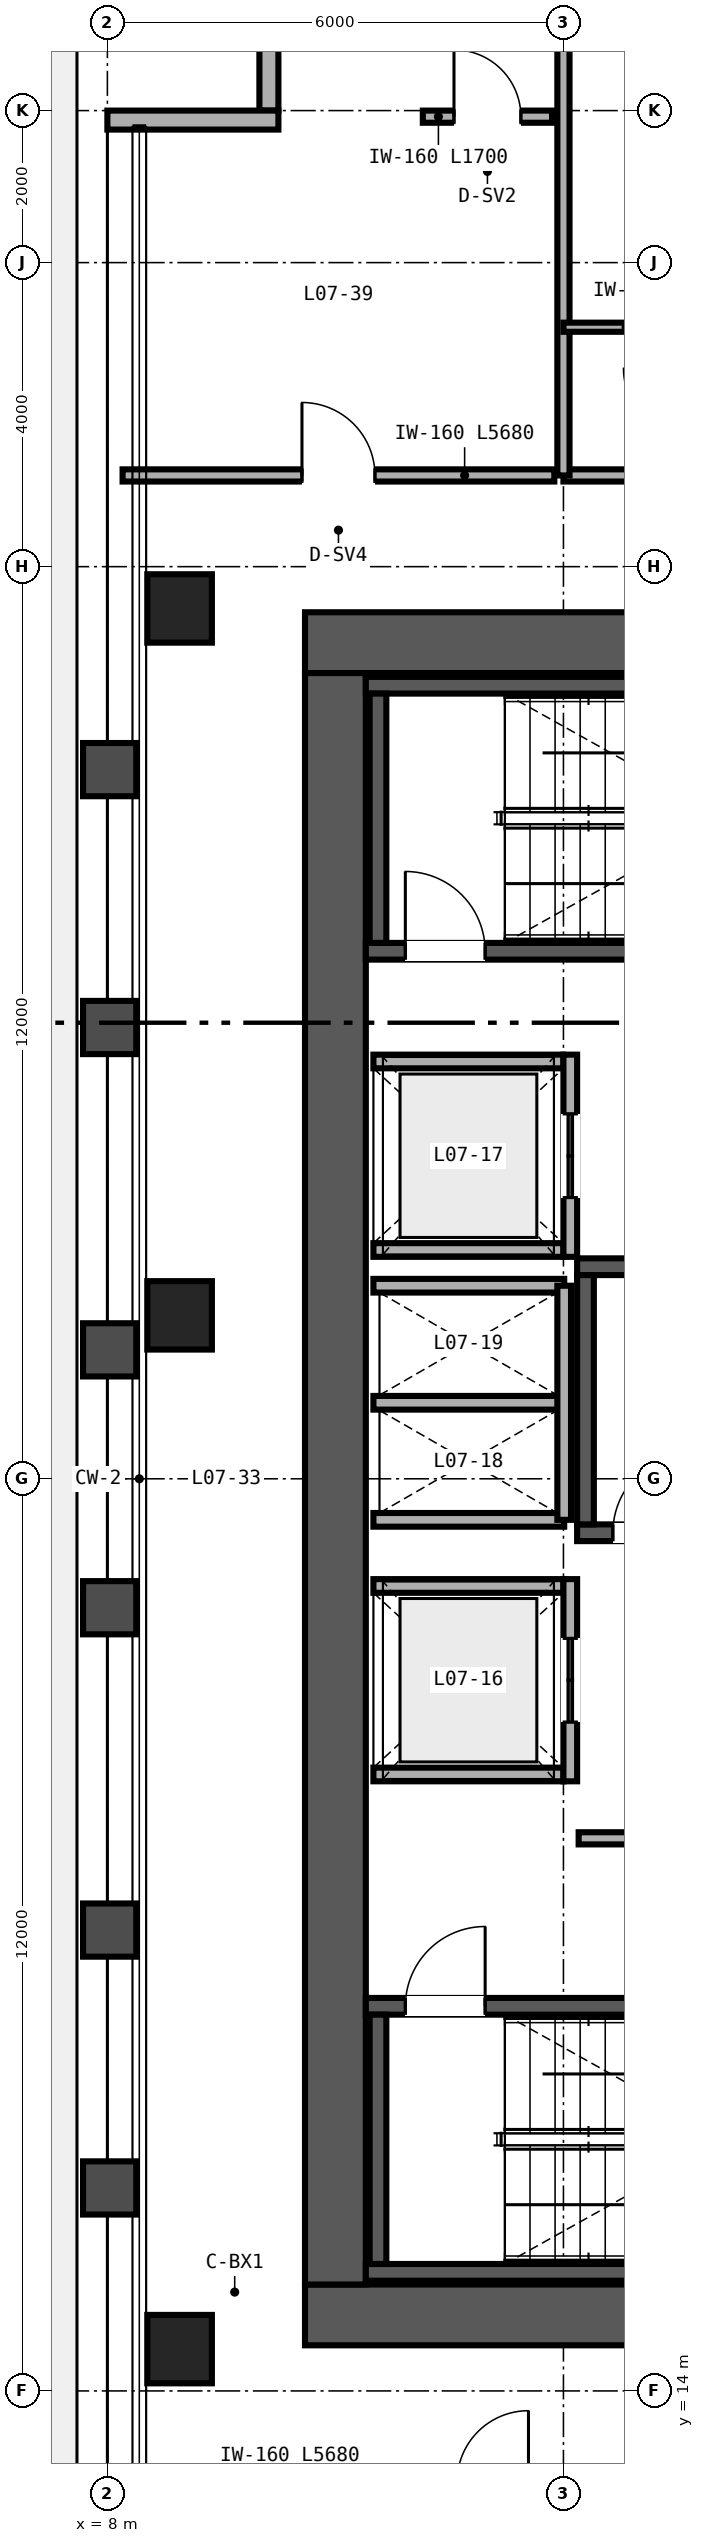
"""IFC4 building model, lengths in metres.
Left out: names, types, materials, properties, quantities, classifications, styles, units other than length and angle.
Written with IfcOpenShell. Run it as: python <this file> out.ifc"""

import sys

from ifc_helpers import new_model, si_unit, direction, frame, frame_2d, origin, origin_2d, place, context, subcontext, project, spatial, rectangle, hollow_rectangle, extrude, source, transform, mapped, element, fill, save


model = new_model("IFC4")
c1 = context("Model", 3, precision=1e-05, world=origin(), true_north=direction((0.0, 1.0)))
c2 = subcontext(c1, "Body", "Model", "MODEL_VIEW")
j1 = project(units=[si_unit("LENGTHUNIT", "METRE"), si_unit("PLANEANGLEUNIT", "RADIAN")], contexts=[c1])
p1 = place(None, origin())
s1 = spatial("IfcSite", under=j1, at=p1, CompositionType="ELEMENT")
p2 = place(p1, origin())
s2 = spatial("IfcBuilding", under=s1, at=p2, CompositionType="ELEMENT")
p3 = place(p2, frame((0.0, 0.0, 34.8)))
s3 = spatial("IfcBuildingStorey", under=s2, at=p3, CompositionType="ELEMENT", Elevation=34.8)
p4 = place(p3, frame((10.6, 15.0, 0.0), z_axis=(0.0, 0.0, 1.0), x_axis=(1.0, 0.0, 0.0)))
e1 = element("IfcWall", 1, at=p4, inside=s3, PredefinedType="SHEAR", context=c2, shape_type="SweptSolid", body=[
    extrude(rectangle(XDim=12.8, YDim=0.8, at=frame_2d((6.4, 0.0))), origin(), (0.0, 0.0, 1.0), 3.35),
])
p5 = place(p4, frame((10.3, 0.0, 0.0)))
e2 = element("IfcOpeningElement", 2, at=p5, cuts=e1, PredefinedType="OPENING", context=c2, shape_type="SweptSolid", body=[
    extrude(rectangle(XDim=1.0, YDim=2.15, at=frame_2d((0.5, 1.075))), frame((0.0, 0.41, 0.0), z_axis=(0.0, -1.0, 0.0), x_axis=(1.0, 0.0, 0.0)), (0.0, 0.0, 1.0), 0.82),
])
p6 = place(p3, frame((10.6, 37.0, 0.0), z_axis=(0.0, 0.0, 1.0), x_axis=(1.0, 0.0, 0.0)))
e3 = element("IfcWall", 3, at=p6, inside=s3, PredefinedType="SHEAR", context=c2, shape_type="SweptSolid", body=[
    extrude(rectangle(XDim=12.8, YDim=0.8, at=frame_2d((6.4, 0.0))), origin(), (0.0, 0.0, 1.0), 3.35),
])
p7 = place(p6, frame((8.98, 0.0, 0.0)))
e4 = element("IfcOpeningElement", 4, at=p7, cuts=e3, PredefinedType="OPENING", context=c2, shape_type="SweptSolid", body=[
    extrude(rectangle(XDim=1.0, YDim=2.15, at=frame_2d((0.5, 1.075))), frame((0.0, 0.41, 0.0), z_axis=(0.0, -1.0, 0.0), x_axis=(1.0, 0.0, 0.0)), (0.0, 0.0, 1.0), 0.82),
])
p8 = place(p3, frame((11.0, 15.4, 0.0), z_axis=(0.0, 0.0, 1.0), x_axis=(0.0, 1.0, 0.0)))
e5 = element("IfcWall", 5, at=p8, inside=s3, PredefinedType="SHEAR", context=c2, shape_type="SweptSolid", body=[
    extrude(rectangle(XDim=21.2, YDim=0.8, at=frame_2d((10.6, 0.0))), origin(), (0.0, 0.0, 1.0), 3.35),
])
p9 = place(p3, frame((11.4, 15.56, 0.0), z_axis=(0.0, 0.0, 1.0), x_axis=(1.0, 0.0, 0.0)))
e6 = element("IfcWall", 6, at=p9, inside=s3, PredefinedType="SHEAR", context=c2, shape_type="SweptSolid", body=[
    extrude(rectangle(XDim=7.91, YDim=0.22, at=frame_2d((3.955, 0.0))), origin(), (0.0, 0.0, 1.0), 3.4),
])
p10 = place(p3, frame((11.4, 19.06, 0.0), z_axis=(0.0, 0.0, 1.0), x_axis=(1.0, 0.0, 0.0)))
e7 = element("IfcWall", 7, at=p10, inside=s3, PredefinedType="SHEAR", context=c2, shape_type="SweptSolid", body=[
    extrude(rectangle(XDim=7.91, YDim=0.22, at=frame_2d((3.955, 0.0))), origin(), (0.0, 0.0, 1.0), 3.4),
])
p11 = place(p10, frame((0.52, 0.0, 0.0)))
e8 = element("IfcOpeningElement", 8, at=p11, cuts=e7, PredefinedType="OPENING", context=c2, shape_type="SweptSolid", body=[
    extrude(rectangle(XDim=1.05, YDim=2.15, at=frame_2d((0.525, 1.075))), frame((0.0, 0.12, 0.0), z_axis=(0.0, -1.0, 0.0), x_axis=(1.0, 0.0, 0.0)), (0.0, 0.0, 1.0), 0.24),
])
p12 = place(p3, frame((11.56, 15.67, 0.0), z_axis=(0.0, 0.0, 1.0), x_axis=(0.0, 1.0, 0.0)))
e9 = element("IfcWall", 9, at=p12, inside=s3, PredefinedType="SHEAR", context=c2, shape_type="SweptSolid", body=[
    extrude(rectangle(XDim=3.28, YDim=0.22, at=frame_2d((1.64, 0.0))), origin(), (0.0, 0.0, 1.0), 3.4),
])
p13 = place(p3, frame((11.4, 32.94, 0.0), z_axis=(0.0, 0.0, 1.0), x_axis=(1.0, 0.0, 0.0)))
e10 = element("IfcWall", 10, at=p13, inside=s3, PredefinedType="SHEAR", context=c2, shape_type="SweptSolid", body=[
    extrude(rectangle(XDim=7.91, YDim=0.22, at=frame_2d((3.955, 0.0))), origin(), (0.0, 0.0, 1.0), 3.4),
])
p14 = place(p13, frame((0.52, 0.0, 0.0)))
e11 = element("IfcOpeningElement", 11, at=p14, cuts=e10, PredefinedType="OPENING", context=c2, shape_type="SweptSolid", body=[
    extrude(rectangle(XDim=1.05, YDim=2.15, at=frame_2d((0.525, 1.075))), frame((0.0, 0.12, 0.0), z_axis=(0.0, -1.0, 0.0), x_axis=(1.0, 0.0, 0.0)), (0.0, 0.0, 1.0), 0.24),
])
p15 = place(p3, frame((11.4, 36.44, 0.0), z_axis=(0.0, 0.0, 1.0), x_axis=(1.0, 0.0, 0.0)))
e12 = element("IfcWall", 12, at=p15, inside=s3, PredefinedType="SHEAR", context=c2, shape_type="SweptSolid", body=[
    extrude(rectangle(XDim=7.91, YDim=0.22, at=frame_2d((3.955, 0.0))), origin(), (0.0, 0.0, 1.0), 3.4),
])
p16 = place(p3, frame((11.56, 33.05, 0.0), z_axis=(0.0, 0.0, 1.0), x_axis=(0.0, 1.0, 0.0)))
e13 = element("IfcWall", 13, at=p16, inside=s3, PredefinedType="SHEAR", context=c2, shape_type="SweptSolid", body=[
    extrude(rectangle(XDim=3.28, YDim=0.22, at=frame_2d((1.64, 0.0))), origin(), (0.0, 0.0, 1.0), 3.4),
])
p17 = place(p3, frame((14.18, 25.29, 0.0), z_axis=(0.0, 0.0, 1.0), x_axis=(1.0, 0.0, 0.0)))
e14 = element("IfcWall", 14, at=p17, inside=s3, PredefinedType="SHEAR", context=c2, shape_type="SweptSolid", body=[
    extrude(rectangle(XDim=8.42, YDim=0.22, at=frame_2d((4.21, 0.0))), origin(), (0.0, 0.0, 1.0), 3.4),
])
p18 = place(p17, frame((0.47, 0.0, 0.0)))
e15 = element("IfcOpeningElement", 15, at=p18, cuts=e14, PredefinedType="OPENING", context=c2, shape_type="SweptSolid", body=[
    extrude(rectangle(XDim=1.05, YDim=2.15, at=frame_2d((0.525, 1.075))), frame((0.0, 0.12, 0.0), z_axis=(0.0, -1.0, 0.0), x_axis=(1.0, 0.0, 0.0)), (0.0, 0.0, 1.0), 0.24),
])
p19 = place(p3, frame((14.18, 28.79, 0.0), z_axis=(0.0, 0.0, 1.0), x_axis=(1.0, 0.0, 0.0)))
e16 = element("IfcWall", 16, at=p19, inside=s3, PredefinedType="SHEAR", context=c2, shape_type="SweptSolid", body=[
    extrude(rectangle(XDim=8.42, YDim=0.22, at=frame_2d((4.21, 0.0))), origin(), (0.0, 0.0, 1.0), 3.4),
])
p20 = place(p3, frame((14.29, 25.4, 0.0), z_axis=(0.0, 0.0, 1.0), x_axis=(0.0, 1.0, 0.0)))
e17 = element("IfcWall", 17, at=p20, inside=s3, PredefinedType="SHEAR", context=c2, shape_type="SweptSolid", body=[
    extrude(rectangle(XDim=3.28, YDim=0.22, at=frame_2d((1.64, 0.0))), origin(), (0.0, 0.0, 1.0), 3.4),
])
m1 = source(origin(), c2, "Body", "SweptSolid", [
    extrude(hollow_rectangle(XDim=0.85, YDim=0.9, WallThickness=0.04, at=origin_2d()), origin(), (0.0, 0.0, 1.0), 3.35),
])
for number, where, z_axis, x_axis in (
    (18, (8.95, 14.55, 0.0), (0.0, 0.0, 1.0), (1.0, 0.0, 0.0)),
    (19, (8.95, 28.15, 0.0), (0.0, 0.0, 1.0), (1.0, 0.0, 0.0)),
    (20, (8.95, 37.45, 0.0), (0.0, 0.0, 1.0), (1.0, 0.0, 0.0)),
):
    element("IfcColumn", number, at=place(p3, frame(where, z_axis=z_axis, x_axis=x_axis)), inside=s3, PredefinedType="COLUMN", context=c2, shape_type="MappedRepresentation", body=[
        mapped(m1, transform((0.0, 0.0, 0.0), scale=1.0)),
    ])
p21 = place(p3, frame((10.125, 46.0, 0.0), z_axis=(0.0, 0.0, 1.0), x_axis=(0.0, -1.0, 0.0)))
e21 = element("IfcWall", 21, at=p21, inside=s3, PredefinedType="SOLIDWALL", context=c2, shape_type="SweptSolid", body=[
    extrude(rectangle(XDim=2.0, YDim=0.25, at=frame_2d((1.0, 0.0))), origin(), (0.0, 0.0, 1.0), 3.35),
])
p22 = place(p3, frame((10.25, 43.875, 0.0), z_axis=(0.0, 0.0, 1.0), x_axis=(-1.0, 0.0, 0.0)))
e22 = element("IfcWall", 22, at=p22, inside=s3, PredefinedType="SOLIDWALL", context=c2, shape_type="SweptSolid", body=[
    extrude(rectangle(XDim=2.25, YDim=0.25, at=frame_2d((1.125, 0.0))), origin(), (0.0, 0.0, 1.0), 3.35),
])
for number, where, z_axis, x_axis in (
    (23, (11.5, 22.11, 0.0), (0.0, 0.0, 1.0), (1.0, 0.0, 0.0)),
    (24, (11.5, 24.59, 0.0), (0.0, 0.0, 1.0), (1.0, 0.0, 0.0)),
):
    element("IfcWall", number, at=place(p3, frame(where, z_axis=z_axis, x_axis=x_axis)), inside=s3, PredefinedType="SOLIDWALL", context=c2, shape_type="SweptSolid", body=[
        extrude(rectangle(XDim=2.5, YDim=0.18, at=frame_2d((1.25, 0.0))), origin(), (0.0, 0.0, 1.0), 3.35),
    ])
p23 = place(p3, frame((14.09, 22.02, 0.0), z_axis=(0.0, 0.0, 1.0), x_axis=(0.0, 1.0, 0.0)))
e25 = element("IfcWall", 25, at=p23, inside=s3, PredefinedType="SOLIDWALL", context=c2, shape_type="SweptSolid", body=[
    extrude(rectangle(XDim=2.66, YDim=0.18, at=frame_2d((1.33, 0.0))), origin(), (0.0, 0.0, 1.0), 3.35),
])
p24 = place(p23, frame((0.78, 0.0, 0.0)))
e26 = element("IfcOpeningElement", 26, at=p24, cuts=e25, PredefinedType="OPENING", context=c2, shape_type="SweptSolid", body=[
    extrude(rectangle(XDim=1.1, YDim=2.2, at=frame_2d((0.55, 1.1))), frame((0.0, 0.1, 0.0), z_axis=(0.0, -1.0, 0.0), x_axis=(1.0, 0.0, 0.0)), (0.0, 0.0, 1.0), 0.2),
])
for number, where, z_axis, x_axis in (
    (27, (11.5, 29.01, 0.0), (0.0, 0.0, 1.0), (1.0, 0.0, 0.0)),
    (28, (11.5, 31.49, 0.0), (0.0, 0.0, 1.0), (1.0, 0.0, 0.0)),
):
    element("IfcWall", number, at=place(p3, frame(where, z_axis=z_axis, x_axis=x_axis)), inside=s3, PredefinedType="SOLIDWALL", context=c2, shape_type="SweptSolid", body=[
        extrude(rectangle(XDim=2.5, YDim=0.18, at=frame_2d((1.25, 0.0))), origin(), (0.0, 0.0, 1.0), 3.35),
    ])
p25 = place(p3, frame((14.09, 28.92, 0.0), z_axis=(0.0, 0.0, 1.0), x_axis=(0.0, 1.0, 0.0)))
e29 = element("IfcWall", 29, at=p25, inside=s3, PredefinedType="SOLIDWALL", context=c2, shape_type="SweptSolid", body=[
    extrude(rectangle(XDim=2.66, YDim=0.18, at=frame_2d((1.33, 0.0))), origin(), (0.0, 0.0, 1.0), 3.35),
])
p26 = place(p25, frame((0.78, 0.0, 0.0)))
e30 = element("IfcOpeningElement", 30, at=p26, cuts=e29, PredefinedType="OPENING", context=c2, shape_type="SweptSolid", body=[
    extrude(rectangle(XDim=1.1, YDim=2.2, at=frame_2d((0.55, 1.1))), frame((0.0, 0.1, 0.0), z_axis=(0.0, -1.0, 0.0), x_axis=(1.0, 0.0, 0.0)), (0.0, 0.0, 1.0), 0.2),
])
for number, where, z_axis, x_axis in (
    (31, (11.5, 25.46, 0.0), (0.0, 0.0, 1.0), (1.0, 0.0, 0.0)),
    (32, (11.5, 27.0, 0.0), (0.0, 0.0, 1.0), (1.0, 0.0, 0.0)),
    (33, (11.5, 28.54, 0.0), (0.0, 0.0, 1.0), (1.0, 0.0, 0.0)),
):
    element("IfcWall", number, at=place(p3, frame(where, z_axis=z_axis, x_axis=x_axis)), inside=s3, PredefinedType="SOLIDWALL", context=c2, shape_type="SweptSolid", body=[
        extrude(rectangle(XDim=2.51, YDim=0.18, at=frame_2d((1.255, 0.0))), origin(), (0.0, 0.0, 1.0), 3.35),
    ])
p27 = place(p3, frame((14.01, 25.46, 0.0), z_axis=(0.0, 0.0, 1.0), x_axis=(0.0, 1.0, 0.0)))
e34 = element("IfcWall", 34, at=p27, inside=s3, PredefinedType="SOLIDWALL", context=c2, shape_type="SweptSolid", body=[
    extrude(rectangle(XDim=3.08, YDim=0.18, at=frame_2d((1.54, 0.0))), origin(), (0.0, 0.0, 1.0), 3.35),
])
p28 = place(p3, frame((14.2, 21.27, 0.0), z_axis=(0.0, 0.0, 1.0), x_axis=(1.0, 0.0, 0.0)))
e35 = element("IfcWall", 35, at=p28, inside=s3, PredefinedType="PARTITIONING", context=c2, shape_type="SweptSolid", body=[
    extrude(rectangle(XDim=4.58, YDim=0.16, at=frame_2d((2.29, 0.0))), origin(), (0.0, 0.0, 1.0), 3.35),
])
p29 = place(p28, frame((1.8, 0.0, 0.0)))
e36 = element("IfcOpeningElement", 36, at=p29, cuts=e35, PredefinedType="OPENING", context=c2, shape_type="SweptSolid", body=[
    extrude(rectangle(XDim=1.0, YDim=2.15, at=frame_2d((0.5, 1.075))), frame((0.0, 0.09, 0.0), z_axis=(0.0, -1.0, 0.0), x_axis=(1.0, 0.0, 0.0)), (0.0, 0.0, 1.0), 0.18),
])
p30 = place(p3, frame((8.2, 39.2, 0.0), z_axis=(0.0, 0.0, 1.0), x_axis=(1.0, 0.0, 0.0)))
e37 = element("IfcWall", 37, at=p30, inside=s3, PredefinedType="PARTITIONING", context=c2, shape_type="SweptSolid", body=[
    extrude(rectangle(XDim=5.68, YDim=0.16, at=frame_2d((2.84, 0.0))), origin(), (0.0, 0.0, 1.0), 3.35),
])
p31 = place(p30, frame((2.36, 0.0, 0.0)))
e38 = element("IfcOpeningElement", 38, at=p31, cuts=e37, PredefinedType="OPENING", context=c2, shape_type="SweptSolid", body=[
    extrude(rectangle(XDim=0.96, YDim=2.15, at=frame_2d((0.48, 1.075))), frame((0.0, 0.09, 0.0), z_axis=(0.0, -1.0, 0.0), x_axis=(1.0, 0.0, 0.0)), (0.0, 0.0, 1.0), 0.18),
])
p32 = place(p3, frame((12.15, 43.92, 0.0), z_axis=(0.0, 0.0, 1.0), x_axis=(1.0, 0.0, 0.0)))
e39 = element("IfcWall", 39, at=p32, inside=s3, PredefinedType="PARTITIONING", context=c2, shape_type="SweptSolid", body=[
    extrude(rectangle(XDim=1.7, YDim=0.16, at=frame_2d((0.85, 0.0))), origin(), (0.0, 0.0, 1.0), 3.35),
])
p33 = place(p32, frame((0.41, 0.0, 0.0)))
e40 = element("IfcOpeningElement", 40, at=p33, cuts=e39, PredefinedType="OPENING", context=c2, shape_type="SweptSolid", body=[
    extrude(rectangle(XDim=0.88, YDim=2.15, at=frame_2d((0.44, 1.075))), frame((0.0, 0.09, 0.0), z_axis=(0.0, -1.0, 0.0), x_axis=(1.0, 0.0, 0.0)), (0.0, 0.0, 1.0), 0.18),
])
p34 = place(p3, frame((14.0, 39.2, 0.0), z_axis=(0.0, 0.0, 1.0), x_axis=(1.0, 0.0, 0.0)))
e41 = element("IfcWall", 41, at=p34, inside=s3, PredefinedType="PARTITIONING", context=c2, shape_type="SweptSolid", body=[
    extrude(rectangle(XDim=36.0, YDim=0.16, at=frame_2d((18.0, 0.0))), origin(), (0.0, 0.0, 1.0), 2.571),
])
p35 = place(p34, frame((3.34, 0.0, 0.0)))
e42 = element("IfcOpeningElement", 42, at=p35, cuts=e41, PredefinedType="OPENING", context=c2, shape_type="SweptSolid", body=[
    extrude(rectangle(XDim=0.94, YDim=2.15, at=frame_2d((0.47, 1.075))), frame((0.0, 0.09, 0.0), z_axis=(0.0, -1.0, 0.0), x_axis=(1.0, 0.0, 0.0)), (0.0, 0.0, 1.0), 0.18),
])
p36 = place(p34, frame((7.79, 0.0, 0.0)))
e43 = element("IfcOpeningElement", 43, at=p36, cuts=e41, PredefinedType="OPENING", context=c2, shape_type="SweptSolid", body=[
    extrude(rectangle(XDim=0.94, YDim=2.15, at=frame_2d((0.47, 1.075))), frame((0.0, 0.09, 0.0), z_axis=(0.0, -1.0, 0.0), x_axis=(1.0, 0.0, 0.0)), (0.0, 0.0, 1.0), 0.18),
])
p37 = place(p34, frame((12.54, 0.0, 0.0)))
e44 = element("IfcOpeningElement", 44, at=p37, cuts=e41, PredefinedType="OPENING", context=c2, shape_type="SweptSolid", body=[
    extrude(rectangle(XDim=0.94, YDim=2.15, at=frame_2d((0.47, 1.075))), frame((0.0, 0.09, 0.0), z_axis=(0.0, -1.0, 0.0), x_axis=(1.0, 0.0, 0.0)), (0.0, 0.0, 1.0), 0.18),
])
p38 = place(p34, frame((17.14, 0.0, 0.0)))
e45 = element("IfcOpeningElement", 45, at=p38, cuts=e41, PredefinedType="OPENING", context=c2, shape_type="SweptSolid", body=[
    extrude(rectangle(XDim=0.94, YDim=2.15, at=frame_2d((0.47, 1.075))), frame((0.0, 0.09, 0.0), z_axis=(0.0, -1.0, 0.0), x_axis=(1.0, 0.0, 0.0)), (0.0, 0.0, 1.0), 0.18),
])
p39 = place(p34, frame((21.74, 0.0, 0.0)))
e46 = element("IfcOpeningElement", 46, at=p39, cuts=e41, PredefinedType="OPENING", context=c2, shape_type="SweptSolid", body=[
    extrude(rectangle(XDim=0.94, YDim=2.15, at=frame_2d((0.47, 1.075))), frame((0.0, 0.09, 0.0), z_axis=(0.0, -1.0, 0.0), x_axis=(1.0, 0.0, 0.0)), (0.0, 0.0, 1.0), 0.18),
])
p40 = place(p34, frame((24.89, 0.0, 0.0)))
e47 = element("IfcOpeningElement", 47, at=p40, cuts=e41, PredefinedType="OPENING", context=c2, shape_type="SweptSolid", body=[
    extrude(rectangle(XDim=0.94, YDim=2.15, at=frame_2d((0.47, 1.075))), frame((0.0, 0.09, 0.0), z_axis=(0.0, -1.0, 0.0), x_axis=(1.0, 0.0, 0.0)), (0.0, 0.0, 1.0), 0.18),
])
p41 = place(p34, frame((30.54, 0.0, 0.0)))
e48 = element("IfcOpeningElement", 48, at=p41, cuts=e41, PredefinedType="OPENING", context=c2, shape_type="SweptSolid", body=[
    extrude(rectangle(XDim=0.94, YDim=2.15, at=frame_2d((0.47, 1.075))), frame((0.0, 0.09, 0.0), z_axis=(0.0, -1.0, 0.0), x_axis=(1.0, 0.0, 0.0)), (0.0, 0.0, 1.0), 0.18),
])
p42 = place(p34, frame((34.74, 0.0, 0.0)))
e49 = element("IfcOpeningElement", 49, at=p42, cuts=e41, PredefinedType="OPENING", context=c2, shape_type="SweptSolid", body=[
    extrude(rectangle(XDim=0.94, YDim=2.15, at=frame_2d((0.47, 1.075))), frame((0.0, 0.09, 0.0), z_axis=(0.0, -1.0, 0.0), x_axis=(1.0, 0.0, 0.0)), (0.0, 0.0, 1.0), 0.18),
])
p43 = place(p3, frame((14.0, 39.2, 0.0), z_axis=(0.0, 0.0, 1.0), x_axis=(0.0, 1.0, 0.0)))
e50 = element("IfcWall", 50, at=p43, inside=s3, PredefinedType="PARTITIONING", context=c2, shape_type="SweptSolid", body=[
    extrude(rectangle(XDim=10.44, YDim=0.16, at=frame_2d((5.22, 0.0))), origin(), (0.0, 0.0, 1.0), 2.657),
])
p44 = place(p3, frame((14.0, 41.15, 0.0), z_axis=(0.0, 0.0, 1.0), x_axis=(1.0, 0.0, 0.0)))
e51 = element("IfcWall", 51, at=p44, inside=s3, PredefinedType="PARTITIONING", context=c2, shape_type="SweptSolid", body=[
    extrude(rectangle(XDim=1.65, YDim=0.12, at=frame_2d((0.825, 0.0))), origin(), (0.0, 0.0, 1.0), 3.35),
])
m2 = source(origin(), c2, "Body", "SweptSolid", [
    extrude(rectangle(XDim=1.05, YDim=2.15, at=frame_2d((0.525, 1.075))), frame((0.0, 0.025, 0.0), z_axis=(0.0, -1.0, 0.0), x_axis=(1.0, 0.0, 0.0)), (0.0, 0.0, 1.0), 0.05),
])
p45 = place(p11, origin())
e52 = element("IfcDoor", 52, at=p45, inside=s3, OperationType="SINGLE_SWING_RIGHT", PredefinedType="DOOR", context=c2, shape_type="MappedRepresentation", body=[
    mapped(m2, transform((0.0, 0.0, 0.0), scale=1.0)),
])
fill(e8, e52)
p46 = place(p14, origin())
e53 = element("IfcDoor", 53, at=p46, inside=s3, OperationType="SINGLE_SWING_LEFT", PredefinedType="DOOR", context=c2, shape_type="MappedRepresentation", body=[
    mapped(m2, transform((0.0, 0.0, 0.0), scale=1.0)),
])
fill(e11, e53)
p47 = place(p18, origin())
e54 = element("IfcDoor", 54, at=p47, inside=s3, OperationType="SINGLE_SWING_RIGHT", PredefinedType="DOOR", context=c2, shape_type="MappedRepresentation", body=[
    mapped(m2, transform((0.0, 0.0, 0.0), scale=1.0)),
])
fill(e15, e54)
m3 = source(origin(), c2, "Body", "SweptSolid", [
    extrude(rectangle(XDim=1.1, YDim=2.2, at=frame_2d((0.55, 1.1))), frame((0.0, 0.025, 0.0), z_axis=(0.0, -1.0, 0.0), x_axis=(1.0, 0.0, 0.0)), (0.0, 0.0, 1.0), 0.05),
])
p48 = place(p24, origin())
e55 = element("IfcDoor", 55, at=p48, inside=s3, OperationType="DOUBLE_DOOR_SLIDING", PredefinedType="DOOR", context=c2, shape_type="MappedRepresentation", body=[
    mapped(m3, transform((0.0, 0.0, 0.0), scale=1.0)),
])
fill(e26, e55)
p49 = place(p26, origin())
e56 = element("IfcDoor", 56, at=p49, inside=s3, OperationType="DOUBLE_DOOR_SLIDING", PredefinedType="DOOR", context=c2, shape_type="MappedRepresentation", body=[
    mapped(m3, transform((0.0, 0.0, 0.0), scale=1.0)),
])
fill(e30, e56)
m4 = source(origin(), c2, "Body", "SweptSolid", [
    extrude(rectangle(XDim=0.96, YDim=2.15, at=frame_2d((0.48, 1.075))), frame((0.0, 0.025, 0.0), z_axis=(0.0, -1.0, 0.0), x_axis=(1.0, 0.0, 0.0)), (0.0, 0.0, 1.0), 0.05),
])
p50 = place(p31, origin())
e57 = element("IfcDoor", 57, at=p50, inside=s3, OperationType="SINGLE_SWING_LEFT", PredefinedType="DOOR", context=c2, shape_type="MappedRepresentation", body=[
    mapped(m4, transform((0.0, 0.0, 0.0), scale=1.0)),
])
fill(e38, e57)
m5 = source(origin(), c2, "Body", "SweptSolid", [
    extrude(rectangle(XDim=0.88, YDim=2.15, at=frame_2d((0.44, 1.075))), frame((0.0, 0.025, 0.0), z_axis=(0.0, -1.0, 0.0), x_axis=(1.0, 0.0, 0.0)), (0.0, 0.0, 1.0), 0.05),
])
p51 = place(p33, origin())
e58 = element("IfcDoor", 58, at=p51, inside=s3, OperationType="SINGLE_SWING_LEFT", PredefinedType="DOOR", context=c2, shape_type="MappedRepresentation", body=[
    mapped(m5, transform((0.0, 0.0, 0.0), scale=1.0)),
])
fill(e40, e58)
save(model, sys.argv[1])
